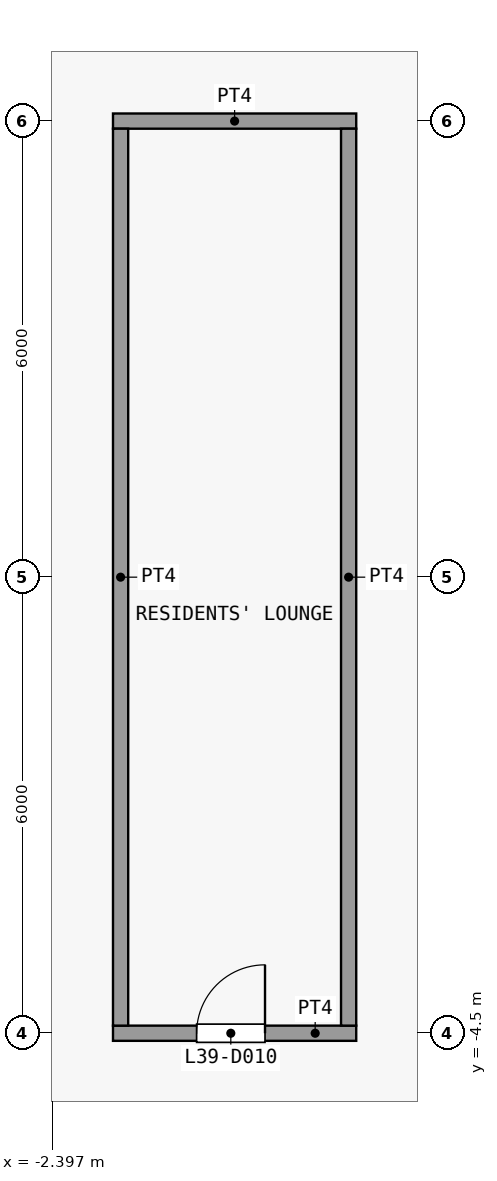
"""IFC4 building model, lengths in metres.
Left out: names, types, materials, properties, quantities, classifications, styles, units other than length and angle.
Written with IfcOpenShell. Run it as: python <this file> out.ifc"""

import sys

from ifc_helpers import new_model, si_unit, direction, frame, frame_2d, origin, place, context, subcontext, project, spatial, rectangle, extrude, element, fill, save


model = new_model("IFC4")
c1 = context("Model", 3, precision=1e-05, world=origin(), true_north=direction((0.0, 1.0)))
c2 = subcontext(c1, "Body", "Model", "MODEL_VIEW")
j1 = project(units=[si_unit("LENGTHUNIT", "METRE"), si_unit("PLANEANGLEUNIT", "RADIAN")], contexts=[c1])
p1 = place(None, origin())
s1 = spatial("IfcSite", under=j1, at=p1, CompositionType="ELEMENT")
p2 = place(p1, origin())
s2 = spatial("IfcBuilding", under=s1, at=p2, CompositionType="ELEMENT")
p3 = place(p2, frame((0.0, 0.0, 160.1)))
s3 = spatial("IfcBuildingStorey", under=s2, at=p3, CompositionType="ELEMENT", Elevation=160.1)
p4 = place(p3, frame((-1.6, -4.5, 0.0), z_axis=(0.0, 0.0, 1.0), x_axis=(1.0, 0.0, 0.0)))
e1 = element("IfcWall", 1, at=p4, inside=s3, PredefinedType="PARTITIONING", context=c2, shape_type="SweptSolid", body=[
    extrude(rectangle(XDim=3.2, YDim=0.2, at=frame_2d((1.6, 0.0))), origin(), (0.0, 0.0, 1.0), 3.3),
])
p5 = place(p4, frame((1.1, 0.0, 0.0)))
e2 = element("IfcOpeningElement", 2, at=p5, cuts=e1, PredefinedType="OPENING", context=c2, shape_type="SweptSolid", body=[
    extrude(rectangle(XDim=0.9, YDim=2.1, at=frame_2d((0.45, 1.05))), frame((0.0, 0.11, 0.0), z_axis=(0.0, -1.0, 0.0), x_axis=(1.0, 0.0, 0.0)), (0.0, 0.0, 1.0), 0.22),
])
p6 = place(p3, frame((-1.6, 7.5, 0.0), z_axis=(0.0, 0.0, 1.0), x_axis=(1.0, 0.0, 0.0)))
e3 = element("IfcWall", 3, at=p6, inside=s3, PredefinedType="PARTITIONING", context=c2, shape_type="SweptSolid", body=[
    extrude(rectangle(XDim=3.2, YDim=0.2, at=frame_2d((1.6, 0.0))), origin(), (0.0, 0.0, 1.0), 3.3),
])
for number, where, z_axis, x_axis in (
    (4, (-1.5, -4.4, 0.0), (0.0, 0.0, 1.0), (0.0, 1.0, 0.0)),
    (5, (1.5, -4.4, 0.0), (0.0, 0.0, 1.0), (0.0, 1.0, 0.0)),
):
    element("IfcWall", number, at=place(p3, frame(where, z_axis=z_axis, x_axis=x_axis)), inside=s3, PredefinedType="PARTITIONING", context=c2, shape_type="SweptSolid", body=[
        extrude(rectangle(XDim=11.8, YDim=0.2, at=frame_2d((5.9, 0.0))), origin(), (0.0, 0.0, 1.0), 3.3),
    ])
p7 = place(p5, origin())
e6 = element("IfcDoor", 6, at=p7, inside=s3, OperationType="SINGLE_SWING_LEFT", PredefinedType="DOOR", context=c2, shape_type="SweptSolid", body=[
    extrude(rectangle(XDim=0.9, YDim=2.1, at=frame_2d((0.45, 1.05))), frame((0.0, 0.025, 0.0), z_axis=(0.0, -1.0, 0.0), x_axis=(1.0, 0.0, 0.0)), (0.0, 0.0, 1.0), 0.05),
])
fill(e2, e6)
save(model, sys.argv[1])
